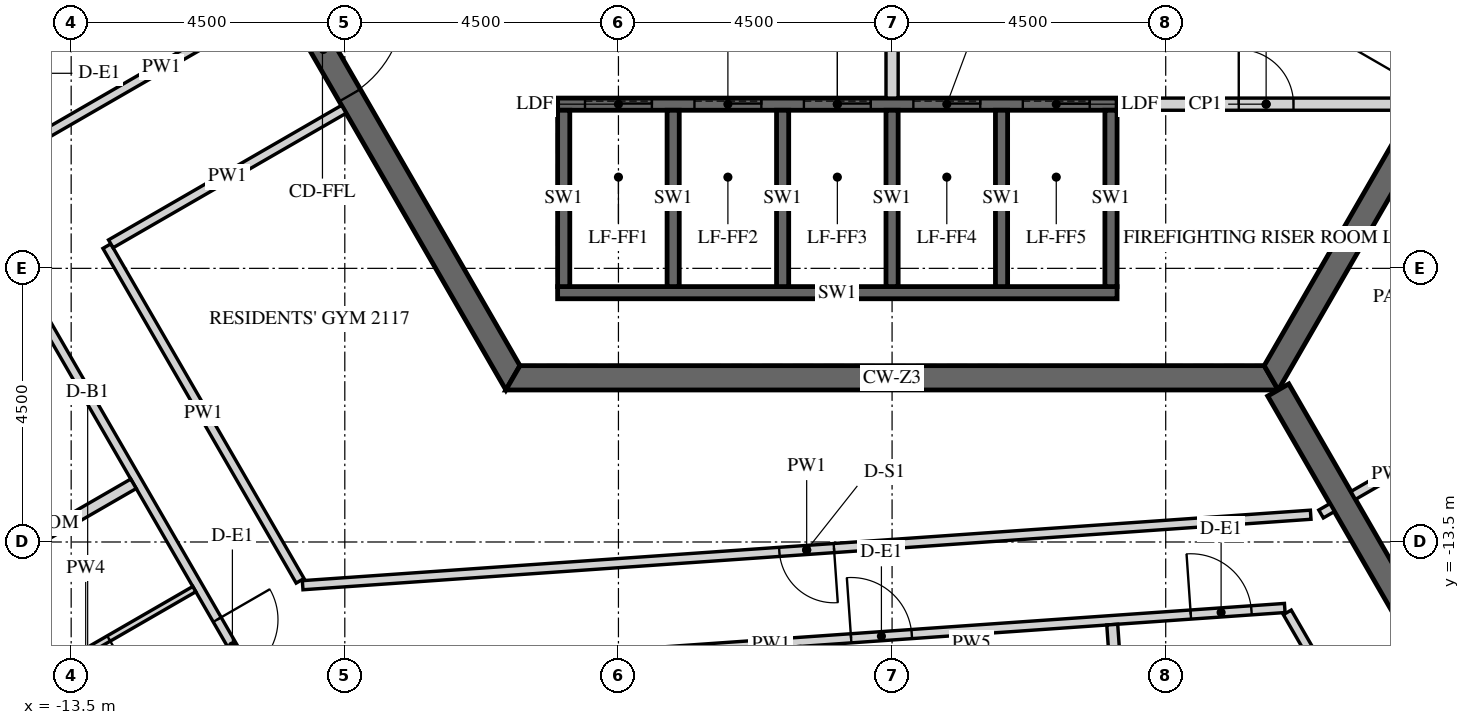
"""IFC4 building model, lengths in metres.
Left out: names, types, materials, properties, quantities, classifications, styles, units other than length and angle.
Written with IfcOpenShell. Run it as: python <this file> out.ifc"""

import sys

from ifc_helpers import new_model, si_unit, direction, frame, frame_2d, origin, place, context, subcontext, project, spatial, polyline, rectangle, outline, extrude, element, fill, save


model = new_model("IFC4")
c1 = context("Model", 3, precision=1e-05, world=origin(), true_north=direction((0.0, 1.0)))
c2 = subcontext(c1, "Body", "Model", "MODEL_VIEW")
j1 = project(units=[si_unit("LENGTHUNIT", "METRE"), si_unit("PLANEANGLEUNIT", "RADIAN")], contexts=[c1])
p1 = place(None, origin())
s1 = spatial("IfcSite", under=j1, at=p1, CompositionType="ELEMENT")
p2 = place(p1, origin())
s2 = spatial("IfcBuilding", under=s1, at=p2, CompositionType="ELEMENT")
p3 = place(p2, frame((0.0, 0.0, 267.9)))
s3 = spatial("IfcBuildingStorey", under=s2, at=p3, CompositionType="ELEMENT", Elevation=267.9)
p4 = place(p3, frame((-12.471, 0.0, -0.15), z_axis=(0.0, 0.0, 1.0), x_axis=(0.499996419489, -0.866027470984, 0.0)))
e1 = element("IfcWall", 1, at=p4, inside=s3, PredefinedType="SHEAR", context=c2, shape_type="SweptSolid", body=[
    extrude(outline(polyline([(-0.115, -0.2), (12.586, -0.2), (12.355, 0.2), (0.115, 0.2), (-0.115, -0.2)])), origin(), (0.0, 0.0, 1.0), 3.9),
])
p5 = place(p4, frame((5.306, 0.0, 0.15)))
e2 = element("IfcOpeningElement", 2, at=p5, cuts=e1, PredefinedType="OPENING", context=c2, shape_type="SweptSolid", body=[
    extrude(rectangle(XDim=1.8, YDim=2.4, at=frame_2d((0.9, 1.2))), frame((0.0, 0.21, 0.0), z_axis=(0.0, -1.0, 0.0), x_axis=(1.0, 0.0, 0.0)), (0.0, 0.0, 1.0), 0.42),
])
p6 = place(p3, frame((-6.235, -10.8, -0.15), z_axis=(0.0, 0.0, 1.0), x_axis=(1.0, 0.0, 0.0)))
e3 = element("IfcWall", 3, at=p6, inside=s3, PredefinedType="SHEAR", context=c2, shape_type="SweptSolid", body=[
    extrude(outline(polyline([(-0.115, -0.2), (12.586, -0.2), (12.355, 0.2), (0.115, 0.2), (-0.115, -0.2)])), origin(), (0.0, 0.0, 1.0), 3.9),
])
p7 = place(p3, frame((6.235, -10.8, -0.15), z_axis=(0.0, 0.0, 1.0), x_axis=(0.499996419489, 0.866027470984, 0.0)))
e4 = element("IfcWall", 4, at=p7, inside=s3, PredefinedType="SHEAR", context=c2, shape_type="SweptSolid", body=[
    extrude(outline(polyline([(-0.115, -0.2), (12.586, -0.2), (12.355, 0.2), (0.115, 0.2), (-0.115, -0.2)])), origin(), (0.0, 0.0, 1.0), 3.9),
])
p8 = place(p7, frame((5.364, 0.0, 0.15)))
e5 = element("IfcOpeningElement", 5, at=p8, cuts=e4, PredefinedType="OPENING", context=c2, shape_type="SweptSolid", body=[
    extrude(rectangle(XDim=1.8, YDim=2.4, at=frame_2d((0.9, 1.2))), frame((0.0, 0.21, 0.0), z_axis=(0.0, -1.0, 0.0), x_axis=(1.0, 0.0, 0.0)), (0.0, 0.0, 1.0), 0.42),
])
p9 = place(p3, frame((6.351, -11.0, -0.15), z_axis=(0.0, 0.0, 1.0), x_axis=(0.499998894578, -0.866026041999, 0.0)))
e6 = element("IfcWall", 6, at=p9, inside=s3, PredefinedType="SHEAR", context=c2, shape_type="SweptSolid", body=[
    extrude(rectangle(XDim=15.544, YDim=0.4, at=frame_2d((7.772, 0.0))), origin(), (0.0, 0.0, 1.0), 3.9),
])
p10 = place(p9, frame((6.872, 0.0, 0.15)))
e7 = element("IfcOpeningElement", 7, at=p10, cuts=e6, PredefinedType="OPENING", context=c2, shape_type="SweptSolid", body=[
    extrude(rectangle(XDim=1.8, YDim=2.4, at=frame_2d((0.9, 1.2))), frame((0.0, 0.21, 0.0), z_axis=(0.0, -1.0, 0.0), x_axis=(1.0, 0.0, 0.0)), (0.0, 0.0, 1.0), 0.42),
])
p11 = place(p3, frame((-5.5, -6.3, -0.25), z_axis=(0.0, 0.0, 1.0), x_axis=(1.0, 0.0, 0.0)))
e8 = element("IfcWall", 8, at=p11, inside=s3, PredefinedType="SHEAR", context=c2, shape_type="SweptSolid", body=[
    extrude(rectangle(XDim=9.2, YDim=0.2, at=frame_2d((4.6, 0.0))), origin(), (0.0, 0.0, 1.0), 3.9),
])
p12 = place(p11, frame((0.45, 0.0, 0.25)))
e9 = element("IfcOpeningElement", 9, at=p12, cuts=e8, PredefinedType="OPENING", context=c2, shape_type="SweptSolid", body=[
    extrude(rectangle(XDim=1.1, YDim=2.1, at=frame_2d((0.55, 1.05))), frame((0.0, 0.11, 0.0), z_axis=(0.0, -1.0, 0.0), x_axis=(1.0, 0.0, 0.0)), (0.0, 0.0, 1.0), 0.22),
])
p13 = place(p11, frame((2.25, 0.0, 0.25)))
e10 = element("IfcOpeningElement", 10, at=p13, cuts=e8, PredefinedType="OPENING", context=c2, shape_type="SweptSolid", body=[
    extrude(rectangle(XDim=1.1, YDim=2.1, at=frame_2d((0.55, 1.05))), frame((0.0, 0.11, 0.0), z_axis=(0.0, -1.0, 0.0), x_axis=(1.0, 0.0, 0.0)), (0.0, 0.0, 1.0), 0.22),
])
p14 = place(p11, frame((4.05, 0.0, 0.25)))
e11 = element("IfcOpeningElement", 11, at=p14, cuts=e8, PredefinedType="OPENING", context=c2, shape_type="SweptSolid", body=[
    extrude(rectangle(XDim=1.1, YDim=2.1, at=frame_2d((0.55, 1.05))), frame((0.0, 0.11, 0.0), z_axis=(0.0, -1.0, 0.0), x_axis=(1.0, 0.0, 0.0)), (0.0, 0.0, 1.0), 0.22),
])
p15 = place(p11, frame((5.85, 0.0, 0.25)))
e12 = element("IfcOpeningElement", 12, at=p15, cuts=e8, PredefinedType="OPENING", context=c2, shape_type="SweptSolid", body=[
    extrude(rectangle(XDim=1.1, YDim=2.1, at=frame_2d((0.55, 1.05))), frame((0.0, 0.11, 0.0), z_axis=(0.0, -1.0, 0.0), x_axis=(1.0, 0.0, 0.0)), (0.0, 0.0, 1.0), 0.22),
])
p16 = place(p11, frame((7.65, 0.0, 0.25)))
e13 = element("IfcOpeningElement", 13, at=p16, cuts=e8, PredefinedType="OPENING", context=c2, shape_type="SweptSolid", body=[
    extrude(rectangle(XDim=1.1, YDim=2.1, at=frame_2d((0.55, 1.05))), frame((0.0, 0.11, 0.0), z_axis=(0.0, -1.0, 0.0), x_axis=(1.0, 0.0, 0.0)), (0.0, 0.0, 1.0), 0.22),
])
p17 = place(p3, frame((-5.5, -9.4, -0.25), z_axis=(0.0, 0.0, 1.0), x_axis=(1.0, 0.0, 0.0)))
e14 = element("IfcWall", 14, at=p17, inside=s3, PredefinedType="SHEAR", context=c2, shape_type="SweptSolid", body=[
    extrude(rectangle(XDim=9.2, YDim=0.2, at=frame_2d((4.6, 0.0))), origin(), (0.0, 0.0, 1.0), 3.9),
])
for number, where, z_axis, x_axis in (
    (15, (-5.4, -9.3, -0.25), (0.0, 0.0, 1.0), (0.0, 1.0, 0.0)),
    (16, (-3.6, -9.3, -0.25), (0.0, 0.0, 1.0), (0.0, 1.0, 0.0)),
    (17, (-1.8, -9.3, -0.25), (0.0, 0.0, 1.0), (0.0, 1.0, 0.0)),
    (18, (0.0, -9.3, -0.25), (0.0, 0.0, 1.0), (0.0, 1.0, 0.0)),
    (19, (1.8, -9.3, -0.25), (0.0, 0.0, 1.0), (0.0, 1.0, 0.0)),
    (20, (3.6, -9.3, -0.25), (0.0, 0.0, 1.0), (0.0, 1.0, 0.0)),
):
    element("IfcWall", number, at=place(p3, frame(where, z_axis=z_axis, x_axis=x_axis)), inside=s3, PredefinedType="SHEAR", context=c2, shape_type="SweptSolid", body=[
        extrude(rectangle(XDim=2.9, YDim=0.2, at=frame_2d((1.45, 0.0))), origin(), (0.0, 0.0, 1.0), 3.9),
    ])
p18 = place(p3, frame((0.0, -6.2, 0.0), z_axis=(0.0, 0.0, 1.0), x_axis=(0.0, 1.0, 0.0)))
e21 = element("IfcWall", 21, at=p18, inside=s3, PredefinedType="PARTITIONING", context=c2, shape_type="SweptSolid", body=[
    extrude(rectangle(XDim=6.1, YDim=0.2, at=frame_2d((3.05, 0.0))), origin(), (0.0, 0.0, 1.0), 3.65),
])
p19 = place(p3, frame((3.7, -6.3, 0.0), z_axis=(0.0, 0.0, 1.0), x_axis=(1.0, 0.0, 0.0)))
e22 = element("IfcWall", 22, at=p19, inside=s3, PredefinedType="PARTITIONING", context=c2, shape_type="SweptSolid", body=[
    extrude(rectangle(XDim=4.903, YDim=0.2, at=frame_2d((2.451, 0.0))), origin(), (0.0, 0.0, 1.0), 3.65),
])
p20 = place(p19, frame((2.001, 0.0, 0.0)))
e23 = element("IfcOpeningElement", 23, at=p20, cuts=e22, PredefinedType="OPENING", context=c2, shape_type="SweptSolid", body=[
    extrude(rectangle(XDim=0.9, YDim=2.1, at=frame_2d((0.45, 1.05))), frame((0.0, 0.11, 0.0), z_axis=(0.0, -1.0, 0.0), x_axis=(1.0, 0.0, 0.0)), (0.0, 0.0, 1.0), 0.22),
])
p21 = place(p3, frame((-17.998, -2.826, 0.0), z_axis=(0.0, 0.0, 1.0), x_axis=(0.500003306199, -0.866023494941, 0.0)))
e24 = element("IfcWall", 24, at=p21, inside=s3, PredefinedType="PARTITIONING", context=c2, shape_type="SweptSolid", body=[
    extrude(rectangle(XDim=14.949, YDim=0.15, at=frame_2d((7.475, 0.0))), origin(), (0.0, 0.0, 1.0), 2.988),
])
p22 = place(p21, frame((2.925, 0.0, 0.0)))
e25 = element("IfcOpeningElement", 25, at=p22, cuts=e24, PredefinedType="OPENING", context=c2, shape_type="SweptSolid", body=[
    extrude(rectangle(XDim=1.0, YDim=2.1, at=frame_2d((0.5, 1.05))), frame((0.0, 0.085, 0.0), z_axis=(0.0, -1.0, 0.0), x_axis=(1.0, 0.0, 0.0)), (0.0, 0.0, 1.0), 0.17),
])
p23 = place(p21, frame((13.799, 0.0, 0.0)))
e26 = element("IfcOpeningElement", 26, at=p23, cuts=e24, PredefinedType="OPENING", context=c2, shape_type="SweptSolid", body=[
    extrude(rectangle(XDim=1.0, YDim=2.1, at=frame_2d((0.5, 1.05))), frame((0.0, 0.085, 0.0), z_axis=(0.0, -1.0, 0.0), x_axis=(1.0, 0.0, 0.0)), (0.0, 0.0, 1.0), 0.17),
])
p24 = place(p3, frame((-10.44, -15.767, 0.0), z_axis=(0.0, 0.0, 1.0), x_axis=(0.997565037323, 0.069742356651, 0.0)))
e27 = element("IfcWall", 27, at=p24, inside=s3, PredefinedType="PARTITIONING", context=c2, shape_type="SweptSolid", body=[
    extrude(rectangle(XDim=16.939, YDim=0.15, at=frame_2d((8.47, 0.0))), origin(), (0.0, 0.0, 1.0), 2.988),
])
p25 = place(p24, frame((9.79, 0.0, 0.0)))
e28 = element("IfcOpeningElement", 28, at=p25, cuts=e27, PredefinedType="OPENING", context=c2, shape_type="SweptSolid", body=[
    extrude(rectangle(XDim=1.0, YDim=2.1, at=frame_2d((0.5, 1.05))), frame((0.0, 0.085, 0.0), z_axis=(0.0, -1.0, 0.0), x_axis=(1.0, 0.0, 0.0)), (0.0, 0.0, 1.0), 0.17),
])
p26 = place(p24, frame((15.39, 0.0, 0.0)))
e29 = element("IfcOpeningElement", 29, at=p26, cuts=e27, PredefinedType="OPENING", context=c2, shape_type="SweptSolid", body=[
    extrude(rectangle(XDim=1.0, YDim=2.1, at=frame_2d((0.5, 1.05))), frame((0.0, 0.085, 0.0), z_axis=(0.0, -1.0, 0.0), x_axis=(1.0, 0.0, 0.0)), (0.0, 0.0, 1.0), 0.17),
])
p27 = place(p3, frame((6.5, -14.657, 0.0), z_axis=(0.0, 0.0, 1.0), x_axis=(0.499966098742, -0.8660449758, 0.0)))
e30 = element("IfcWall", 30, at=p27, inside=s3, PredefinedType="PARTITIONING", context=c2, shape_type="SweptSolid", body=[
    extrude(rectangle(XDim=7.431, YDim=0.15, at=frame_2d((3.715, 0.0))), origin(), (0.0, 0.0, 1.0), 2.988),
])
p28 = place(p27, frame((4.03, 0.0, 0.0)))
e31 = element("IfcOpeningElement", 31, at=p28, cuts=e30, PredefinedType="OPENING", context=c2, shape_type="SweptSolid", body=[
    extrude(rectangle(XDim=1.0, YDim=2.1, at=frame_2d((0.5, 1.05))), frame((0.0, 0.085, 0.0), z_axis=(0.0, -1.0, 0.0), x_axis=(1.0, 0.0, 0.0)), (0.0, 0.0, 1.0), 0.17),
])
p29 = place(p3, frame((-10.066, -4.566, 0.0), z_axis=(0.0, 0.0, 1.0), x_axis=(-0.866031096941, -0.499990139034, 0.0)))
e32 = element("IfcWall", 32, at=p29, inside=s3, PredefinedType="PARTITIONING", context=c2, shape_type="SweptSolid", body=[
    extrude(rectangle(XDim=4.5, YDim=0.15, at=frame_2d((2.25, 0.0))), origin(), (0.0, 0.0, 1.0), 2.988),
])
p30 = place(p3, frame((7.237, -12.935, 0.0), z_axis=(0.0, 0.0, 1.0), x_axis=(-0.866088799389, -0.499890179513, 0.0)))
e33 = element("IfcWall", 33, at=p30, inside=s3, PredefinedType="PARTITIONING", context=c2, shape_type="SweptSolid", body=[
    extrude(rectangle(XDim=0.21, YDim=0.15, at=frame_2d((0.105, 0.0))), origin(), (0.0, 0.0, 1.0), 2.988),
])
p31 = place(p3, frame((6.884, -13.052, 0.0), z_axis=(0.0, 0.0, 1.0), x_axis=(-0.997564224443, -0.069753982764, 0.0)))
e34 = element("IfcWall", 34, at=p31, inside=s3, PredefinedType="PARTITIONING", context=c2, shape_type="SweptSolid", body=[
    extrude(rectangle(XDim=16.618, YDim=0.15, at=frame_2d((8.309, 0.0))), origin(), (0.0, 0.0, 1.0), 2.988),
])
p32 = place(p31, frame((7.859, 0.0, 0.0)))
e35 = element("IfcOpeningElement", 35, at=p32, cuts=e34, PredefinedType="OPENING", context=c2, shape_type="SweptSolid", body=[
    extrude(rectangle(XDim=0.9, YDim=2.1, at=frame_2d((0.45, 1.05))), frame((0.0, 0.085, 0.0), z_axis=(0.0, -1.0, 0.0), x_axis=(1.0, 0.0, 0.0)), (0.0, 0.0, 1.0), 0.17),
])
p33 = place(p3, frame((-9.735, -14.138, 0.0), z_axis=(0.0, 0.0, 1.0), x_axis=(-0.500018385592, 0.866014788598, 0.0)))
e36 = element("IfcWall", 36, at=p33, inside=s3, PredefinedType="PARTITIONING", context=c2, shape_type="SweptSolid", body=[
    extrude(rectangle(XDim=6.356, YDim=0.15, at=frame_2d((3.178, 0.0))), origin(), (0.0, 0.0, 1.0), 2.988),
])
p34 = place(p3, frame((-12.848, -8.597, 0.0), z_axis=(0.0, 0.0, 1.0), x_axis=(0.866017452598, 0.500013771606, 0.0)))
e37 = element("IfcWall", 37, at=p34, inside=s3, PredefinedType="PARTITIONING", context=c2, shape_type="SweptSolid", body=[
    extrude(rectangle(XDim=4.425, YDim=0.15, at=frame_2d((2.213, 0.0))), origin(), (0.0, 0.0, 1.0), 2.988),
])
p35 = place(p3, frame((8.817, -12.022, 0.0), z_axis=(0.0, 0.0, 1.0), x_axis=(-0.866062911188, -0.499935029643, 0.0)))
e38 = element("IfcWall", 38, at=p35, inside=s3, PredefinedType="PARTITIONING", context=c2, shape_type="SweptSolid", body=[
    extrude(rectangle(XDim=1.425, YDim=0.15, at=frame_2d((0.712, 0.0))), origin(), (0.0, 0.0, 1.0), 2.988),
])
p36 = place(p3, frame((-19.771, -16.755, 0.0), z_axis=(0.0, 0.0, 1.0), x_axis=(0.866026819143, 0.499997548519, 0.0)))
e39 = element("IfcWall", 39, at=p36, inside=s3, PredefinedType="PARTITIONING", context=c2, shape_type="SweptSolid", body=[
    extrude(rectangle(XDim=8.425, YDim=0.18, at=frame_2d((4.212, 0.0))), origin(), (0.0, 0.0, 1.0), 2.988),
])
p37 = place(p3, frame((-11.475, -14.275, 0.0), z_axis=(0.0, 0.0, 1.0), x_axis=(-0.866019999656, -0.500009360108, 0.0)))
e40 = element("IfcWall", 40, at=p37, inside=s3, PredefinedType="PARTITIONING", context=c2, shape_type="SweptSolid", body=[
    extrude(rectangle(XDim=4.125, YDim=0.1, at=frame_2d((2.062, 0.0))), origin(), (0.0, 0.0, 1.0), 2.988),
])
p38 = place(p37, frame((1.625, 0.0, 0.0)))
e41 = element("IfcOpeningElement", 41, at=p38, cuts=e40, PredefinedType="OPENING", context=c2, shape_type="SweptSolid", body=[
    extrude(rectangle(XDim=0.8, YDim=2.1, at=frame_2d((0.4, 1.05))), frame((0.0, 0.06, 0.0), z_axis=(0.0, -1.0, 0.0), x_axis=(1.0, 0.0, 0.0)), (0.0, 0.0, 1.0), 0.12),
])
p39 = place(p3, frame((1.385, -17.295, 0.0), z_axis=(0.0, 0.0, 1.0), x_axis=(-0.069759707979, 0.997563824095, 0.0)))
e42 = element("IfcWall", 42, at=p39, inside=s3, PredefinedType="PARTITIONING", context=c2, shape_type="SweptSolid", body=[
    extrude(rectangle(XDim=2.275, YDim=0.1, at=frame_2d((1.137, 0.0))), origin(), (0.0, 0.0, 1.0), 2.988),
])
p40 = place(p39, frame((0.7, 0.0, 0.0)))
e43 = element("IfcOpeningElement", 43, at=p40, cuts=e42, PredefinedType="OPENING", context=c2, shape_type="SweptSolid", body=[
    extrude(rectangle(XDim=0.9, YDim=2.1, at=frame_2d((0.45, 1.05))), frame((0.0, 0.06, 0.0), z_axis=(0.0, -1.0, 0.0), x_axis=(1.0, 0.0, 0.0)), (0.0, 0.0, 1.0), 0.12),
])
p41 = place(p3, frame((4.208, -23.263, 0.0), z_axis=(0.0, 0.0, 1.0), x_axis=(-0.069749826803, 0.997564515037, 0.0)))
e44 = element("IfcWall", 44, at=p41, inside=s3, PredefinedType="PARTITIONING", context=c2, shape_type="SweptSolid", body=[
    extrude(rectangle(XDim=8.425, YDim=0.18, at=frame_2d((4.212, 0.0))), origin(), (0.0, 0.0, 1.0), 2.988),
])
p42 = place(p5, origin())
e45 = element("IfcDoor", 45, at=p42, inside=s3, OperationType="DOUBLE_DOOR_SINGLE_SWING", PredefinedType="DOOR", context=c2, shape_type="SweptSolid", body=[
    extrude(rectangle(XDim=1.8, YDim=2.4, at=frame_2d((0.9, 1.2))), frame((0.0, 0.025, 0.0), z_axis=(0.0, -1.0, 0.0), x_axis=(1.0, 0.0, 0.0)), (0.0, 0.0, 1.0), 0.05),
])
fill(e2, e45)
p43 = place(p20, origin())
e46 = element("IfcDoor", 46, at=p43, inside=s3, OperationType="SINGLE_SWING_LEFT", PredefinedType="DOOR", context=c2, shape_type="SweptSolid", body=[
    extrude(rectangle(XDim=0.9, YDim=2.1, at=frame_2d((0.45, 1.05))), frame((0.0, 0.025, 0.0), z_axis=(0.0, -1.0, 0.0), x_axis=(1.0, 0.0, 0.0)), (0.0, 0.0, 1.0), 0.05),
])
fill(e23, e46)
p44 = place(p12, origin())
e47 = element("IfcDoor", 47, at=p44, inside=s3, OperationType="SLIDING_TO_LEFT", PredefinedType="DOOR", context=c2, shape_type="SweptSolid", body=[
    extrude(rectangle(XDim=1.1, YDim=2.1, at=frame_2d((0.55, 1.05))), frame((0.0, 0.025, 0.0), z_axis=(0.0, -1.0, 0.0), x_axis=(1.0, 0.0, 0.0)), (0.0, 0.0, 1.0), 0.05),
])
fill(e9, e47)
p45 = place(p13, origin())
e48 = element("IfcDoor", 48, at=p45, inside=s3, OperationType="SLIDING_TO_LEFT", PredefinedType="DOOR", context=c2, shape_type="SweptSolid", body=[
    extrude(rectangle(XDim=1.1, YDim=2.1, at=frame_2d((0.55, 1.05))), frame((0.0, 0.025, 0.0), z_axis=(0.0, -1.0, 0.0), x_axis=(1.0, 0.0, 0.0)), (0.0, 0.0, 1.0), 0.05),
])
fill(e10, e48)
p46 = place(p14, origin())
e49 = element("IfcDoor", 49, at=p46, inside=s3, OperationType="SLIDING_TO_LEFT", PredefinedType="DOOR", context=c2, shape_type="SweptSolid", body=[
    extrude(rectangle(XDim=1.1, YDim=2.1, at=frame_2d((0.55, 1.05))), frame((0.0, 0.025, 0.0), z_axis=(0.0, -1.0, 0.0), x_axis=(1.0, 0.0, 0.0)), (0.0, 0.0, 1.0), 0.05),
])
fill(e11, e49)
p47 = place(p15, origin())
e50 = element("IfcDoor", 50, at=p47, inside=s3, OperationType="SLIDING_TO_LEFT", PredefinedType="DOOR", context=c2, shape_type="SweptSolid", body=[
    extrude(rectangle(XDim=1.1, YDim=2.1, at=frame_2d((0.55, 1.05))), frame((0.0, 0.025, 0.0), z_axis=(0.0, -1.0, 0.0), x_axis=(1.0, 0.0, 0.0)), (0.0, 0.0, 1.0), 0.05),
])
fill(e12, e50)
p48 = place(p16, origin())
e51 = element("IfcDoor", 51, at=p48, inside=s3, OperationType="SLIDING_TO_LEFT", PredefinedType="DOOR", context=c2, shape_type="SweptSolid", body=[
    extrude(rectangle(XDim=1.1, YDim=2.1, at=frame_2d((0.55, 1.05))), frame((0.0, 0.025, 0.0), z_axis=(0.0, -1.0, 0.0), x_axis=(1.0, 0.0, 0.0)), (0.0, 0.0, 1.0), 0.05),
])
fill(e13, e51)
p49 = place(p23, origin())
e52 = element("IfcDoor", 52, at=p49, inside=s3, OperationType="SINGLE_SWING_LEFT", PredefinedType="DOOR", context=c2, shape_type="SweptSolid", body=[
    extrude(rectangle(XDim=1.0, YDim=2.1, at=frame_2d((0.5, 1.05))), frame((0.0, 0.025, 0.0), z_axis=(0.0, -1.0, 0.0), x_axis=(1.0, 0.0, 0.0)), (0.0, 0.0, 1.0), 0.05),
])
fill(e26, e52)
p50 = place(p38, origin())
e53 = element("IfcDoor", 53, at=p50, inside=s3, OperationType="SINGLE_SWING_RIGHT", PredefinedType="DOOR", context=c2, shape_type="SweptSolid", body=[
    extrude(rectangle(XDim=0.8, YDim=2.1, at=frame_2d((0.4, 1.05))), frame((0.0, 0.025, 0.0), z_axis=(0.0, -1.0, 0.0), x_axis=(1.0, 0.0, 0.0)), (0.0, 0.0, 1.0), 0.05),
])
fill(e41, e53)
p51 = place(p25, origin())
e54 = element("IfcDoor", 54, at=p51, inside=s3, OperationType="SINGLE_SWING_RIGHT", PredefinedType="DOOR", context=c2, shape_type="SweptSolid", body=[
    extrude(rectangle(XDim=1.0, YDim=2.1, at=frame_2d((0.5, 1.05))), frame((0.0, 0.025, 0.0), z_axis=(0.0, -1.0, 0.0), x_axis=(1.0, 0.0, 0.0)), (0.0, 0.0, 1.0), 0.05),
])
fill(e28, e54)
p52 = place(p26, origin())
e55 = element("IfcDoor", 55, at=p52, inside=s3, OperationType="SINGLE_SWING_LEFT", PredefinedType="DOOR", context=c2, shape_type="SweptSolid", body=[
    extrude(rectangle(XDim=1.0, YDim=2.1, at=frame_2d((0.5, 1.05))), frame((0.0, 0.025, 0.0), z_axis=(0.0, -1.0, 0.0), x_axis=(1.0, 0.0, 0.0)), (0.0, 0.0, 1.0), 0.05),
])
fill(e29, e55)
p53 = place(p32, origin())
e56 = element("IfcDoor", 56, at=p53, inside=s3, OperationType="SINGLE_SWING_RIGHT", PredefinedType="DOOR", context=c2, shape_type="SweptSolid", body=[
    extrude(rectangle(XDim=0.9, YDim=2.1, at=frame_2d((0.45, 1.05))), frame((0.0, 0.025, 0.0), z_axis=(0.0, -1.0, 0.0), x_axis=(1.0, 0.0, 0.0)), (0.0, 0.0, 1.0), 0.05),
])
fill(e35, e56)
save(model, sys.argv[1])
